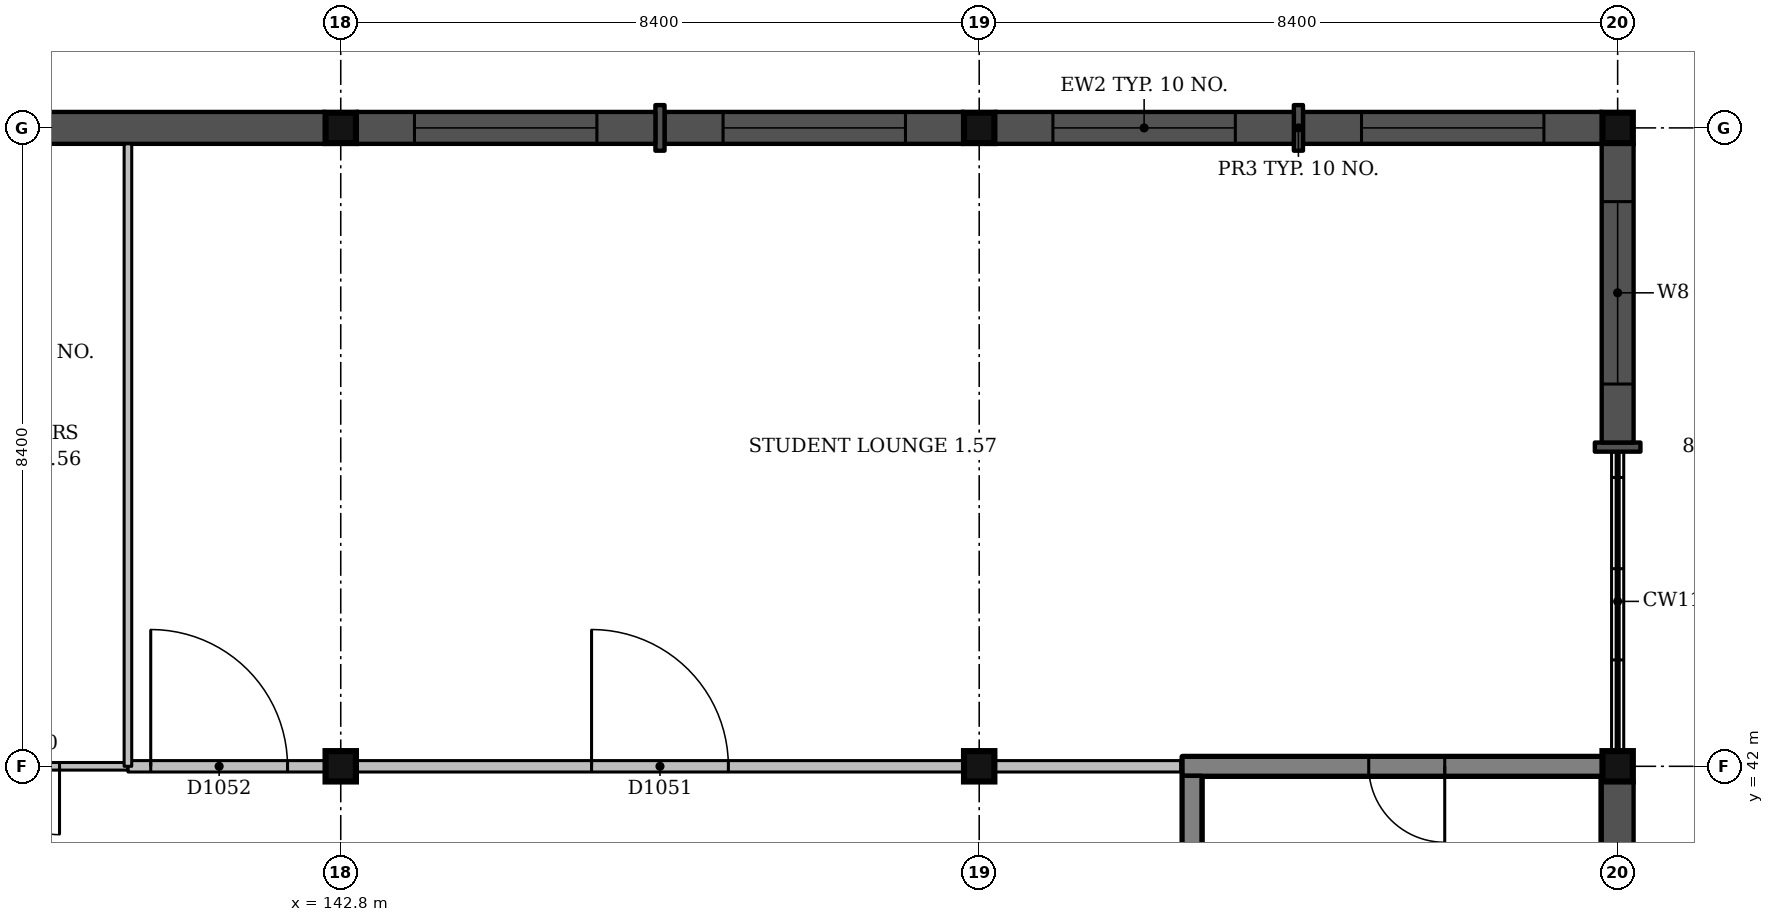
"""IFC4 building model, lengths in metres.
Left out: names, types, materials, properties, quantities, classifications, styles, units other than length and angle.
Written with IfcOpenShell. Run it as: python <this file> out.ifc"""

import sys

from ifc_helpers import new_model, si_unit, direction, frame, frame_2d, origin, origin_2d, place, context, subcontext, project, spatial, rectangle, extrude, element, fill, save


model = new_model("IFC4")
c1 = context("Model", 3, precision=1e-05, world=origin(), true_north=direction((0.0, 1.0)))
c2 = subcontext(c1, "Body", "Model", "MODEL_VIEW")
j1 = project(units=[si_unit("LENGTHUNIT", "METRE"), si_unit("PLANEANGLEUNIT", "RADIAN")], contexts=[c1])
p1 = place(None, origin())
s1 = spatial("IfcSite", under=j1, at=p1, CompositionType="ELEMENT")
p2 = place(p1, origin())
s2 = spatial("IfcBuilding", under=s1, at=p2, CompositionType="ELEMENT")
p3 = place(p2, frame((0.0, 0.0, 4.5)))
s3 = spatial("IfcBuildingStorey", under=s2, at=p3, CompositionType="ELEMENT", Elevation=4.5)
for number, where, z_axis, x_axis in (
    (1, (142.8, 42.0, 0.0), (0.0, 0.0, 1.0), (1.0, 0.0, 0.0)),
    (2, (142.8, 50.4, 0.0), (0.0, 0.0, 1.0), (1.0, 0.0, 0.0)),
    (3, (151.2, 42.0, 0.0), (0.0, 0.0, 1.0), (1.0, 0.0, 0.0)),
    (4, (151.2, 50.4, 0.0), (0.0, 0.0, 1.0), (1.0, 0.0, 0.0)),
    (5, (159.6, 42.0, 0.0), (0.0, 0.0, 1.0), (1.0, 0.0, 0.0)),
    (6, (159.6, 50.4, 0.0), (0.0, 0.0, 1.0), (1.0, 0.0, 0.0)),
):
    element("IfcColumn", number, at=place(p3, frame(where, z_axis=z_axis, x_axis=x_axis)), inside=s3, PredefinedType="COLUMN", context=c2, shape_type="SweptSolid", body=[
        extrude(rectangle(XDim=0.4, YDim=0.4, at=origin_2d()), origin(), (0.0, 0.0, 1.0), 4.5),
    ])
p4 = place(p3, frame((153.875, 42.0, 0.0), z_axis=(0.0, 0.0, 1.0), x_axis=(1.0, 0.0, 0.0)))
e7 = element("IfcWall", 7, at=p4, inside=s3, PredefinedType="SHEAR", context=c2, shape_type="SweptSolid", body=[
    extrude(rectangle(XDim=5.525, YDim=0.25, at=frame_2d((2.762, 0.0))), origin(), (0.0, 0.0, 1.0), 4.5),
])
p5 = place(p4, frame((2.45, 0.0, 0.0)))
e8 = element("IfcOpeningElement", 8, at=p5, cuts=e7, PredefinedType="OPENING", context=c2, shape_type="SweptSolid", body=[
    extrude(rectangle(XDim=1.0, YDim=2.1, at=frame_2d((0.5, 1.05))), frame((0.0, 0.135, 0.0), z_axis=(0.0, -1.0, 0.0), x_axis=(1.0, 0.0, 0.0)), (0.0, 0.0, 1.0), 0.27),
])
p6 = place(p3, frame((154.0, 33.725, 0.0), z_axis=(0.0, 0.0, 1.0), x_axis=(0.0, 1.0, 0.0)))
e9 = element("IfcWall", 9, at=p6, inside=s3, PredefinedType="SHEAR", context=c2, shape_type="SweptSolid", body=[
    extrude(rectangle(XDim=8.15, YDim=0.25, at=frame_2d((4.075, 0.0))), origin(), (0.0, 0.0, 1.0), 4.5),
])
p7 = place(p3, frame((159.6, 37.86, 0.0), z_axis=(0.0, 0.0, 1.0), x_axis=(0.0, 1.0, 0.0)))
e10 = element("IfcWall", 10, at=p7, inside=s3, PredefinedType="SOLIDWALL", context=c2, shape_type="SweptSolid", body=[
    extrude(rectangle(XDim=3.94, YDim=0.42, at=frame_2d((1.97, 0.0))), origin(), (0.0, 0.0, 1.0), 3.75),
])
p8 = place(p3, frame((159.6, 46.14, 0.0), z_axis=(0.0, 0.0, 1.0), x_axis=(0.0, 1.0, 0.0)))
e11 = element("IfcWall", 11, at=p8, inside=s3, PredefinedType="SOLIDWALL", context=c2, shape_type="SweptSolid", body=[
    extrude(rectangle(XDim=0.12, YDim=0.6, at=frame_2d((0.06, 0.0))), origin(), (0.0, 0.0, 1.0), 3.5),
])
p9 = place(p3, frame((159.6, 46.26, 0.0), z_axis=(0.0, 0.0, 1.0), x_axis=(0.0, 1.0, 0.0)))
e12 = element("IfcWall", 12, at=p9, inside=s3, PredefinedType="SOLIDWALL", context=c2, shape_type="SweptSolid", body=[
    extrude(rectangle(XDim=3.94, YDim=0.42, at=frame_2d((1.97, 0.0))), origin(), (0.0, 0.0, 1.0), 3.5),
])
p10 = place(p9, frame((0.77, 0.0, 0.9)))
e13 = element("IfcOpeningElement", 13, at=p10, cuts=e12, PredefinedType="OPENING", context=c2, shape_type="SweptSolid", body=[
    extrude(rectangle(XDim=2.4, YDim=1.8, at=frame_2d((1.2, 0.9))), frame((0.0, 0.22, 0.0), z_axis=(0.0, -1.0, 0.0), x_axis=(1.0, 0.0, 0.0)), (0.0, 0.0, 1.0), 0.44),
])
p11 = place(p3, frame((159.4, 50.4, 0.0), z_axis=(0.0, 0.0, 1.0), x_axis=(-1.0, 0.0, 0.0)))
e14 = element("IfcWall", 14, at=p11, inside=s3, PredefinedType="SOLIDWALL", context=c2, shape_type="SweptSolid", body=[
    extrude(rectangle(XDim=3.94, YDim=0.42, at=frame_2d((1.97, 0.0))), origin(), (0.0, 0.0, 1.0), 3.5),
])
p12 = place(p11, frame((0.77, 0.0, 0.9)))
e15 = element("IfcOpeningElement", 15, at=p12, cuts=e14, PredefinedType="OPENING", context=c2, shape_type="SweptSolid", body=[
    extrude(rectangle(XDim=2.4, YDim=1.8, at=frame_2d((1.2, 0.9))), frame((0.0, 0.22, 0.0), z_axis=(0.0, -1.0, 0.0), x_axis=(1.0, 0.0, 0.0)), (0.0, 0.0, 1.0), 0.44),
])
p13 = place(p3, frame((155.46, 50.4, 0.0), z_axis=(0.0, 0.0, 1.0), x_axis=(-1.0, 0.0, 0.0)))
e16 = element("IfcWall", 16, at=p13, inside=s3, PredefinedType="SOLIDWALL", context=c2, shape_type="SweptSolid", body=[
    extrude(rectangle(XDim=0.12, YDim=0.6, at=frame_2d((0.06, 0.0))), origin(), (0.0, 0.0, 1.0), 3.5),
])
p14 = place(p3, frame((155.34, 50.4, 0.0), z_axis=(0.0, 0.0, 1.0), x_axis=(-1.0, 0.0, 0.0)))
e17 = element("IfcWall", 17, at=p14, inside=s3, PredefinedType="SOLIDWALL", context=c2, shape_type="SweptSolid", body=[
    extrude(rectangle(XDim=3.94, YDim=0.42, at=frame_2d((1.97, 0.0))), origin(), (0.0, 0.0, 1.0), 3.5),
])
p15 = place(p14, frame((0.77, 0.0, 0.9)))
e18 = element("IfcOpeningElement", 18, at=p15, cuts=e17, PredefinedType="OPENING", context=c2, shape_type="SweptSolid", body=[
    extrude(rectangle(XDim=2.4, YDim=1.8, at=frame_2d((1.2, 0.9))), frame((0.0, 0.22, 0.0), z_axis=(0.0, -1.0, 0.0), x_axis=(1.0, 0.0, 0.0)), (0.0, 0.0, 1.0), 0.44),
])
p16 = place(p3, frame((151.0, 50.4, 0.0), z_axis=(0.0, 0.0, 1.0), x_axis=(-1.0, 0.0, 0.0)))
e19 = element("IfcWall", 19, at=p16, inside=s3, PredefinedType="SOLIDWALL", context=c2, shape_type="SweptSolid", body=[
    extrude(rectangle(XDim=3.94, YDim=0.42, at=frame_2d((1.97, 0.0))), origin(), (0.0, 0.0, 1.0), 3.5),
])
p17 = place(p16, frame((0.77, 0.0, 0.9)))
e20 = element("IfcOpeningElement", 20, at=p17, cuts=e19, PredefinedType="OPENING", context=c2, shape_type="SweptSolid", body=[
    extrude(rectangle(XDim=2.4, YDim=1.8, at=frame_2d((1.2, 0.9))), frame((0.0, 0.22, 0.0), z_axis=(0.0, -1.0, 0.0), x_axis=(1.0, 0.0, 0.0)), (0.0, 0.0, 1.0), 0.44),
])
p18 = place(p3, frame((147.06, 50.4, 0.0), z_axis=(0.0, 0.0, 1.0), x_axis=(-1.0, 0.0, 0.0)))
e21 = element("IfcWall", 21, at=p18, inside=s3, PredefinedType="SOLIDWALL", context=c2, shape_type="SweptSolid", body=[
    extrude(rectangle(XDim=0.12, YDim=0.6, at=frame_2d((0.06, 0.0))), origin(), (0.0, 0.0, 1.0), 3.5),
])
p19 = place(p3, frame((146.94, 50.4, 0.0), z_axis=(0.0, 0.0, 1.0), x_axis=(-1.0, 0.0, 0.0)))
e22 = element("IfcWall", 22, at=p19, inside=s3, PredefinedType="SOLIDWALL", context=c2, shape_type="SweptSolid", body=[
    extrude(rectangle(XDim=3.94, YDim=0.42, at=frame_2d((1.97, 0.0))), origin(), (0.0, 0.0, 1.0), 3.5),
])
p20 = place(p19, frame((0.77, 0.0, 0.9)))
e23 = element("IfcOpeningElement", 23, at=p20, cuts=e22, PredefinedType="OPENING", context=c2, shape_type="SweptSolid", body=[
    extrude(rectangle(XDim=2.4, YDim=1.8, at=frame_2d((1.2, 0.9))), frame((0.0, 0.22, 0.0), z_axis=(0.0, -1.0, 0.0), x_axis=(1.0, 0.0, 0.0)), (0.0, 0.0, 1.0), 0.44),
])
p21 = place(p3, frame((142.6, 50.4, 0.0), z_axis=(0.0, 0.0, 1.0), x_axis=(-1.0, 0.0, 0.0)))
e24 = element("IfcWall", 24, at=p21, inside=s3, PredefinedType="SOLIDWALL", context=c2, shape_type="SweptSolid", body=[
    extrude(rectangle(XDim=3.94, YDim=0.42, at=frame_2d((1.97, 0.0))), origin(), (0.0, 0.0, 1.0), 3.5),
])
p22 = place(p3, frame((140.0, 42.0, 0.0), z_axis=(0.0, 0.0, 1.0), x_axis=(1.0, 0.0, 0.0)))
e25 = element("IfcWall", 25, at=p22, inside=s3, PredefinedType="PARTITIONING", context=c2, shape_type="SweptSolid", body=[
    extrude(rectangle(XDim=2.6, YDim=0.15, at=frame_2d((1.3, 0.0))), origin(), (0.0, 0.0, 1.0), 3.55),
])
p23 = place(p22, frame((0.3, 0.0, 0.0)))
e26 = element("IfcOpeningElement", 26, at=p23, cuts=e25, PredefinedType="OPENING", context=c2, shape_type="SweptSolid", body=[
    extrude(rectangle(XDim=1.8, YDim=2.1, at=frame_2d((0.9, 1.05))), frame((0.0, 0.085, 0.0), z_axis=(0.0, -1.0, 0.0), x_axis=(1.0, 0.0, 0.0)), (0.0, 0.0, 1.0), 0.17),
])
p24 = place(p3, frame((143.0, 42.0, 0.0), z_axis=(0.0, 0.0, 1.0), x_axis=(1.0, 0.0, 0.0)))
e27 = element("IfcWall", 27, at=p24, inside=s3, PredefinedType="PARTITIONING", context=c2, shape_type="SweptSolid", body=[
    extrude(rectangle(XDim=8.0, YDim=0.15, at=frame_2d((4.0, 0.0))), origin(), (0.0, 0.0, 1.0), 3.55),
])
p25 = place(p24, frame((3.1, 0.0, 0.0)))
e28 = element("IfcOpeningElement", 28, at=p25, cuts=e27, PredefinedType="OPENING", context=c2, shape_type="SweptSolid", body=[
    extrude(rectangle(XDim=1.8, YDim=2.1, at=frame_2d((0.9, 1.05))), frame((0.0, 0.085, 0.0), z_axis=(0.0, -1.0, 0.0), x_axis=(1.0, 0.0, 0.0)), (0.0, 0.0, 1.0), 0.17),
])
p26 = place(p3, frame((151.4, 42.0, 0.0), z_axis=(0.0, 0.0, 1.0), x_axis=(1.0, 0.0, 0.0)))
e29 = element("IfcWall", 29, at=p26, inside=s3, PredefinedType="PARTITIONING", context=c2, shape_type="SweptSolid", body=[
    extrude(rectangle(XDim=2.45, YDim=0.15, at=frame_2d((1.225, 0.0))), origin(), (0.0, 0.0, 1.0), 3.65),
])
p27 = place(p3, frame((134.6, 42.0, 0.0), z_axis=(0.0, 0.0, 1.0), x_axis=(1.0, 0.0, 0.0)))
e30 = element("IfcWall", 30, at=p27, inside=s3, PredefinedType="PARTITIONING", context=c2, shape_type="SweptSolid", body=[
    extrude(rectangle(XDim=5.4, YDim=0.1, at=frame_2d((2.7, 0.0))), origin(), (0.0, 0.0, 1.0), 3.55),
])
p28 = place(p27, frame((0.65, 0.0, 0.0)))
e31 = element("IfcOpeningElement", 31, at=p28, cuts=e30, PredefinedType="OPENING", context=c2, shape_type="SweptSolid", body=[
    extrude(rectangle(XDim=1.0, YDim=2.1, at=frame_2d((0.5, 1.05))), frame((0.0, 0.06, 0.0), z_axis=(0.0, -1.0, 0.0), x_axis=(1.0, 0.0, 0.0)), (0.0, 0.0, 1.0), 0.12),
])
p29 = place(p27, frame((3.6, 0.0, 0.0)))
e32 = element("IfcOpeningElement", 32, at=p29, cuts=e30, PredefinedType="OPENING", context=c2, shape_type="SweptSolid", body=[
    extrude(rectangle(XDim=0.9, YDim=2.1, at=frame_2d((0.45, 1.05))), frame((0.0, 0.06, 0.0), z_axis=(0.0, -1.0, 0.0), x_axis=(1.0, 0.0, 0.0)), (0.0, 0.0, 1.0), 0.12),
])
p30 = place(p3, frame((140.0, 42.0, 0.0), z_axis=(0.0, 0.0, 1.0), x_axis=(0.0, 1.0, 0.0)))
e33 = element("IfcWall", 33, at=p30, inside=s3, PredefinedType="PARTITIONING", context=c2, shape_type="SweptSolid", body=[
    extrude(rectangle(XDim=8.19, YDim=0.1, at=frame_2d((4.095, 0.0))), origin(), (0.0, 0.0, 1.0), 3.55),
])
p31 = place(p10, origin())
e34 = element("IfcWindow", 34, at=p31, inside=s3, PartitioningType="SINGLE_PANEL", PredefinedType="WINDOW", context=c2, shape_type="SweptSolid", body=[
    extrude(rectangle(XDim=2.4, YDim=1.8, at=frame_2d((1.2, 0.9))), frame((0.0, 0.15, 0.0), z_axis=(0.0, -1.0, 0.0), x_axis=(1.0, 0.0, 0.0)), (0.0, 0.0, 1.0), 0.06),
])
fill(e13, e34)
p32 = place(p12, origin())
e35 = element("IfcWindow", 35, at=p32, inside=s3, PartitioningType="SINGLE_PANEL", PredefinedType="WINDOW", context=c2, shape_type="SweptSolid", body=[
    extrude(rectangle(XDim=2.4, YDim=1.8, at=frame_2d((1.2, 0.9))), frame((0.0, 0.15, 0.0), z_axis=(0.0, -1.0, 0.0), x_axis=(1.0, 0.0, 0.0)), (0.0, 0.0, 1.0), 0.06),
])
fill(e15, e35)
p33 = place(p15, origin())
e36 = element("IfcWindow", 36, at=p33, inside=s3, PartitioningType="SINGLE_PANEL", PredefinedType="WINDOW", context=c2, shape_type="SweptSolid", body=[
    extrude(rectangle(XDim=2.4, YDim=1.8, at=frame_2d((1.2, 0.9))), frame((0.0, 0.15, 0.0), z_axis=(0.0, -1.0, 0.0), x_axis=(1.0, 0.0, 0.0)), (0.0, 0.0, 1.0), 0.06),
])
fill(e18, e36)
p34 = place(p17, origin())
e37 = element("IfcWindow", 37, at=p34, inside=s3, PartitioningType="SINGLE_PANEL", PredefinedType="WINDOW", context=c2, shape_type="SweptSolid", body=[
    extrude(rectangle(XDim=2.4, YDim=1.8, at=frame_2d((1.2, 0.9))), frame((0.0, 0.15, 0.0), z_axis=(0.0, -1.0, 0.0), x_axis=(1.0, 0.0, 0.0)), (0.0, 0.0, 1.0), 0.06),
])
fill(e20, e37)
p35 = place(p20, origin())
e38 = element("IfcWindow", 38, at=p35, inside=s3, PartitioningType="SINGLE_PANEL", PredefinedType="WINDOW", context=c2, shape_type="SweptSolid", body=[
    extrude(rectangle(XDim=2.4, YDim=1.8, at=frame_2d((1.2, 0.9))), frame((0.0, 0.15, 0.0), z_axis=(0.0, -1.0, 0.0), x_axis=(1.0, 0.0, 0.0)), (0.0, 0.0, 1.0), 0.06),
])
fill(e23, e38)
p36 = place(p29, origin())
e39 = element("IfcDoor", 39, at=p36, inside=s3, OperationType="SINGLE_SWING_RIGHT", PredefinedType="DOOR", context=c2, shape_type="SweptSolid", body=[
    extrude(rectangle(XDim=0.9, YDim=2.1, at=frame_2d((0.45, 1.05))), frame((0.0, 0.025, 0.0), z_axis=(0.0, -1.0, 0.0), x_axis=(1.0, 0.0, 0.0)), (0.0, 0.0, 1.0), 0.05),
])
fill(e32, e39)
p37 = place(p25, origin())
e40 = element("IfcDoor", 40, at=p37, inside=s3, OperationType="DOUBLE_DOOR_SINGLE_SWING", PredefinedType="DOOR", context=c2, shape_type="SweptSolid", body=[
    extrude(rectangle(XDim=1.8, YDim=2.1, at=frame_2d((0.9, 1.05))), frame((0.0, 0.025, 0.0), z_axis=(0.0, -1.0, 0.0), x_axis=(1.0, 0.0, 0.0)), (0.0, 0.0, 1.0), 0.05),
])
fill(e28, e40)
p38 = place(p23, origin())
e41 = element("IfcDoor", 41, at=p38, inside=s3, OperationType="DOUBLE_DOOR_SINGLE_SWING", PredefinedType="DOOR", context=c2, shape_type="SweptSolid", body=[
    extrude(rectangle(XDim=1.8, YDim=2.1, at=frame_2d((0.9, 1.05))), frame((0.0, 0.025, 0.0), z_axis=(0.0, -1.0, 0.0), x_axis=(1.0, 0.0, 0.0)), (0.0, 0.0, 1.0), 0.05),
])
fill(e26, e41)
p39 = place(p5, origin())
e42 = element("IfcDoor", 42, at=p39, inside=s3, OperationType="SINGLE_SWING_RIGHT", PredefinedType="DOOR", context=c2, shape_type="SweptSolid", body=[
    extrude(rectangle(XDim=1.0, YDim=2.1, at=frame_2d((0.5, 1.05))), frame((0.0, 0.025, 0.0), z_axis=(0.0, -1.0, 0.0), x_axis=(1.0, 0.0, 0.0)), (0.0, 0.0, 1.0), 0.05),
])
fill(e8, e42)
save(model, sys.argv[1])
